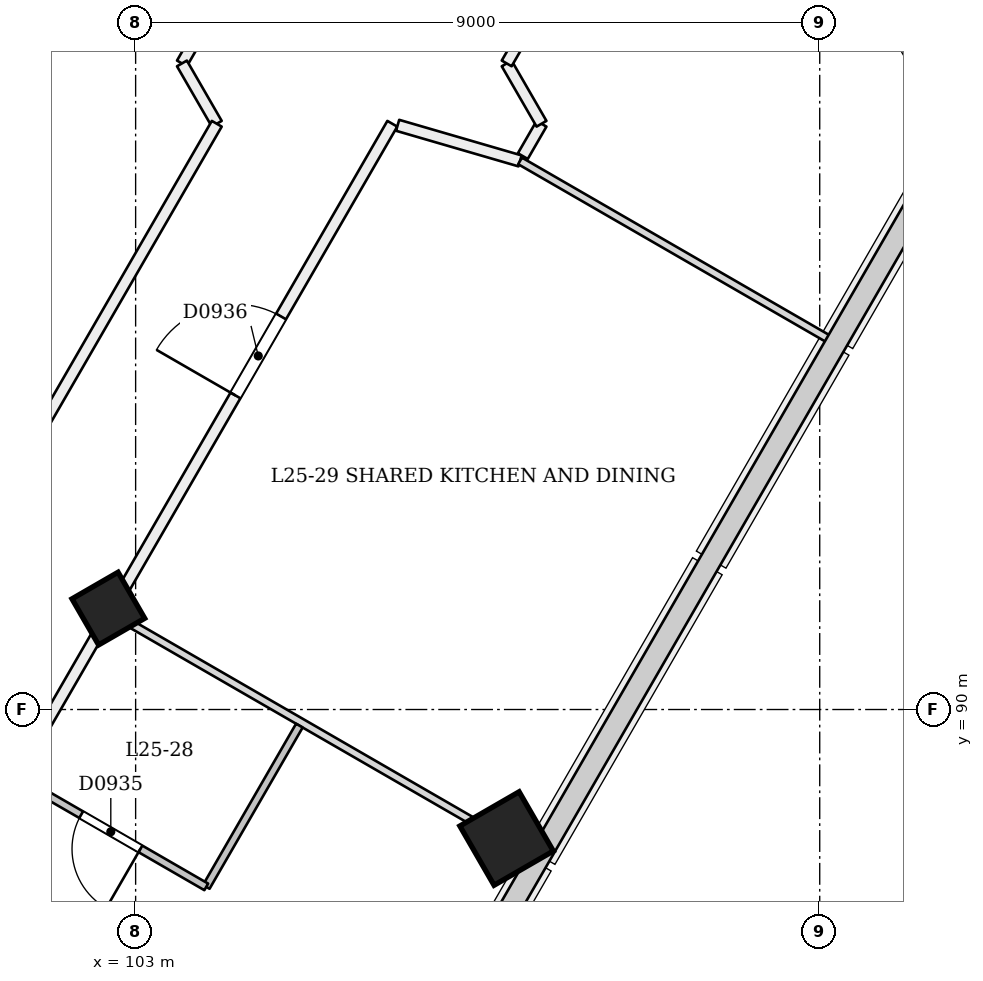
"""IFC4 building model, lengths in metres.
Left out: names, types, materials, properties, quantities, classifications, styles, units other than length and angle.
Written with IfcOpenShell. Run it as: python <this file> out.ifc"""

import sys

from ifc_helpers import new_model, si_unit, direction, frame, frame_2d, origin, origin_2d, place, context, subcontext, project, spatial, rectangle, extrude, element, fill, save


model = new_model("IFC4")
c1 = context("Model", 3, precision=1e-05, world=origin(), true_north=direction((0.0, 1.0)))
c2 = subcontext(c1, "Body", "Model", "MODEL_VIEW")
j1 = project(units=[si_unit("LENGTHUNIT", "METRE"), si_unit("PLANEANGLEUNIT", "RADIAN")], contexts=[c1])
p1 = place(None, origin())
s1 = spatial("IfcSite", under=j1, at=p1, CompositionType="ELEMENT")
p2 = place(p1, origin())
s2 = spatial("IfcBuilding", under=s1, at=p2, CompositionType="ELEMENT")
p3 = place(p2, frame((0.0, 0.0, 100.8)))
s3 = spatial("IfcBuildingStorey", under=s2, at=p3, CompositionType="ELEMENT", Elevation=100.8)
p4 = place(p3, frame((102.668, 91.281, -0.021), z_axis=(-0.02215519141, 0.038415882353, 0.999016199807), x_axis=(-0.50065279292, -0.865364153162, 0.02217348332)))
e1 = element("IfcColumn", 1, at=p4, inside=s3, PredefinedType="COLUMN", context=c2, shape_type="SweptSolid", body=[
    extrude(rectangle(XDim=0.7, YDim=0.7, at=origin_2d()), origin(), (0.0, 0.0, 1.0), 3.604),
])
p5 = place(p3, frame((107.907, 88.257, 0.0), z_axis=(-0.022186675517, 0.038434148665, 0.999014798512), x_axis=(-0.500299208999, -0.865568216906, 0.022189262211)))
e2 = element("IfcColumn", 2, at=p5, inside=s3, PredefinedType="COLUMN", context=c2, shape_type="SweptSolid", body=[
    extrude(rectangle(XDim=0.9, YDim=0.9, at=origin_2d()), origin(), (0.0, 0.0, 1.0), 3.576),
])
p6 = place(p3, frame((85.458, 61.474, 0.0), z_axis=(0.0, 0.0, 1.0), x_axis=(0.500000781663, 0.866024952491, 0.0)))
e3 = element("IfcWall", 3, at=p6, inside=s3, PredefinedType="PARTITIONING", context=c2, shape_type="SweptSolid", body=[
    extrude(rectangle(XDim=41.837, YDim=0.15, at=frame_2d((20.919, 0.0))), origin(), (0.0, 0.0, 1.0), 2.7),
])
p7 = place(p6, frame((0.253, 0.0, 0.0)))
e4 = element("IfcOpeningElement", 4, at=p7, cuts=e3, PredefinedType="OPENING", context=c2, shape_type="SweptSolid", body=[
    extrude(rectangle(XDim=1.2, YDim=2.1, at=frame_2d((0.6, 1.05))), frame((0.0, 0.085, 0.0), z_axis=(0.0, -1.0, 0.0), x_axis=(1.0, 0.0, 0.0)), (0.0, 0.0, 1.0), 0.171),
])
p8 = place(p6, frame((5.719, 0.0, 0.0)))
e5 = element("IfcOpeningElement", 5, at=p8, cuts=e3, PredefinedType="OPENING", context=c2, shape_type="SweptSolid", body=[
    extrude(rectangle(XDim=1.2, YDim=2.1, at=frame_2d((0.6, 1.05))), frame((0.0, 0.085, 0.0), z_axis=(0.0, -1.0, 0.0), x_axis=(1.0, 0.0, 0.0)), (0.0, 0.0, 1.0), 0.171),
])
p9 = place(p6, frame((13.669, 0.0, 0.0)))
e6 = element("IfcOpeningElement", 6, at=p9, cuts=e3, PredefinedType="OPENING", context=c2, shape_type="SweptSolid", body=[
    extrude(rectangle(XDim=1.0, YDim=2.1, at=frame_2d((0.5, 1.05))), frame((0.0, 0.085, 0.0), z_axis=(0.0, -1.0, 0.0), x_axis=(1.0, 0.0, 0.0)), (0.0, 0.0, 1.0), 0.171),
])
p10 = place(p6, frame((18.169, 0.0, 0.0)))
e7 = element("IfcOpeningElement", 7, at=p10, cuts=e3, PredefinedType="OPENING", context=c2, shape_type="SweptSolid", body=[
    extrude(rectangle(XDim=1.0, YDim=2.1, at=frame_2d((0.5, 1.05))), frame((0.0, 0.085, 0.0), z_axis=(0.0, -1.0, 0.0), x_axis=(1.0, 0.0, 0.0)), (0.0, 0.0, 1.0), 0.171),
])
p11 = place(p6, frame((21.639, 0.0, 0.0)))
e8 = element("IfcOpeningElement", 8, at=p11, cuts=e3, PredefinedType="OPENING", context=c2, shape_type="SweptSolid", body=[
    extrude(rectangle(XDim=1.0, YDim=2.1, at=frame_2d((0.5, 1.05))), frame((0.0, 0.085, 0.0), z_axis=(0.0, -1.0, 0.0), x_axis=(1.0, 0.0, 0.0)), (0.0, 0.0, 1.0), 0.171),
])
p12 = place(p6, frame((27.169, 0.0, 0.0)))
e9 = element("IfcOpeningElement", 9, at=p12, cuts=e3, PredefinedType="OPENING", context=c2, shape_type="SweptSolid", body=[
    extrude(rectangle(XDim=1.0, YDim=2.1, at=frame_2d((0.5, 1.05))), frame((0.0, 0.085, 0.0), z_axis=(0.0, -1.0, 0.0), x_axis=(1.0, 0.0, 0.0)), (0.0, 0.0, 1.0), 0.171),
])
p13 = place(p6, frame((30.639, 0.0, 0.0)))
e10 = element("IfcOpeningElement", 10, at=p13, cuts=e3, PredefinedType="OPENING", context=c2, shape_type="SweptSolid", body=[
    extrude(rectangle(XDim=1.0, YDim=2.1, at=frame_2d((0.5, 1.05))), frame((0.0, 0.085, 0.0), z_axis=(0.0, -1.0, 0.0), x_axis=(1.0, 0.0, 0.0)), (0.0, 0.0, 1.0), 0.171),
])
p14 = place(p6, frame((37.71, 0.0, 0.0)))
e11 = element("IfcOpeningElement", 11, at=p14, cuts=e3, PredefinedType="OPENING", context=c2, shape_type="SweptSolid", body=[
    extrude(rectangle(XDim=1.2, YDim=2.1, at=frame_2d((0.6, 1.05))), frame((0.0, 0.085, 0.0), z_axis=(0.0, -1.0, 0.0), x_axis=(1.0, 0.0, 0.0)), (0.0, 0.0, 1.0), 0.171),
])
p15 = place(p3, frame((106.447, 97.686, 0.0), z_axis=(0.0, 0.0, 1.0), x_axis=(0.96025063578, -0.279139242108, 0.0)))
e12 = element("IfcWall", 12, at=p15, inside=s3, PredefinedType="PARTITIONING", context=c2, shape_type="SweptSolid", body=[
    extrude(rectangle(XDim=1.677, YDim=0.15, at=frame_2d((0.839, 0.0))), origin(), (0.0, 0.0, 1.0), 3.1),
])
p16 = place(p3, frame((108.094, 97.281, 0.0), z_axis=(0.0, 0.0, 1.0), x_axis=(0.500037662692, 0.866003658127, 0.0)))
e13 = element("IfcWall", 13, at=p16, inside=s3, PredefinedType="PARTITIONING", context=c2, shape_type="SweptSolid", body=[
    extrude(rectangle(XDim=0.492, YDim=0.15, at=frame_2d((0.246, 0.0))), origin(), (0.0, 0.0, 1.0), 3.1),
])
p17 = place(p3, frame((108.34, 97.706, 0.0), z_axis=(0.0, 0.0, 1.0), x_axis=(-0.500006847747, 0.8660214502, 0.0)))
e14 = element("IfcWall", 14, at=p17, inside=s3, PredefinedType="PARTITIONING", context=c2, shape_type="SweptSolid", body=[
    extrude(rectangle(XDim=0.917, YDim=0.15, at=frame_2d((0.458, 0.0))), origin(), (0.0, 0.0, 1.0), 3.1),
])
p18 = place(p3, frame((107.882, 98.5, 0.0), z_axis=(0.0, 0.0, 1.0), x_axis=(0.499951854219, 0.86605319898, 0.0)))
e15 = element("IfcWall", 15, at=p18, inside=s3, PredefinedType="PARTITIONING", context=c2, shape_type="SweptSolid", body=[
    extrude(rectangle(XDim=1.873, YDim=0.15, at=frame_2d((0.937, 0.0))), origin(), (0.0, 0.0, 1.0), 3.1),
])
p19 = place(p3, frame((104.764, 100.5, 0.0), z_axis=(0.0, 0.0, 1.0), x_axis=(-0.500027479704, -0.866009537788, 0.0)))
e16 = element("IfcWall", 16, at=p19, inside=s3, PredefinedType="PARTITIONING", context=c2, shape_type="SweptSolid", body=[
    extrude(rectangle(XDim=2.309, YDim=0.15, at=frame_2d((1.155, 0.0))), origin(), (0.0, 0.0, 1.0), 3.1),
])
p20 = place(p3, frame((103.609, 98.5, 0.0), z_axis=(0.0, 0.0, 1.0), x_axis=(0.500006847747, -0.8660214502, 0.0)))
e17 = element("IfcWall", 17, at=p20, inside=s3, PredefinedType="PARTITIONING", context=c2, shape_type="SweptSolid", body=[
    extrude(rectangle(XDim=0.917, YDim=0.15, at=frame_2d((0.458, 0.0))), origin(), (0.0, 0.0, 1.0), 3.1),
])
p21 = place(p3, frame((104.067, 97.706, 0.0), z_axis=(0.0, 0.0, 1.0), x_axis=(-0.499978838982, -0.866037620759, 0.0)))
e18 = element("IfcWall", 18, at=p21, inside=s3, PredefinedType="PARTITIONING", context=c2, shape_type="SweptSolid", body=[
    extrude(rectangle(XDim=6.127, YDim=0.15, at=frame_2d((3.063, 0.0))), origin(), (0.0, 0.0, 1.0), 3.1),
])
p22 = place(p3, frame((105.154, 89.788, 0.0), z_axis=(0.0, 0.0, 1.0), x_axis=(-0.500018594424, -0.866014668023, 0.0)))
e19 = element("IfcWall", 19, at=p22, inside=s3, PredefinedType="PARTITIONING", context=c2, shape_type="SweptSolid", body=[
    extrude(rectangle(XDim=2.45, YDim=0.1, at=frame_2d((1.225, 0.0))), origin(), (0.0, 0.0, 1.0), 2.7),
])
p23 = place(p3, frame((103.929, 87.667, 0.0), z_axis=(0.0, 0.0, 1.0), x_axis=(-0.866048868473, 0.499959355765, 0.0)))
e20 = element("IfcWall", 20, at=p23, inside=s3, PredefinedType="PARTITIONING", context=c2, shape_type="SweptSolid", body=[
    extrude(rectangle(XDim=2.825, YDim=0.1, at=frame_2d((1.413, 0.0))), origin(), (0.0, 0.0, 1.0), 3.1),
])
p24 = place(p23, frame((1.0, 0.0, 0.0)))
e21 = element("IfcOpeningElement", 21, at=p24, cuts=e20, PredefinedType="OPENING", context=c2, shape_type="SweptSolid", body=[
    extrude(rectangle(XDim=0.9, YDim=2.1, at=frame_2d((0.45, 1.05))), frame((0.0, 0.061, 0.0), z_axis=(0.0, -1.0, 0.0), x_axis=(1.0, 0.0, 0.0)), (0.0, 0.0, 1.0), 0.121),
])
p25 = place(p3, frame((108.21, 88.082, 0.0), z_axis=(0.0, 0.0, 1.0), x_axis=(-0.866025537322, 0.499999768706, 0.0)))
e22 = element("IfcWall", 22, at=p25, inside=s3, PredefinedType="PARTITIONING", context=c2, shape_type="SweptSolid", body=[
    extrude(rectangle(XDim=6.325, YDim=0.1, at=frame_2d((3.163, 0.0))), origin(), (0.0, 0.0, 1.0), 2.6),
])
p26 = place(p3, frame((112.146, 94.857, 0.0), z_axis=(0.0, 0.0, 1.0), x_axis=(-0.866028828302, 0.499994068514, 0.0)))
e23 = element("IfcWall", 23, at=p26, inside=s3, PredefinedType="PARTITIONING", context=c2, shape_type="SweptSolid", body=[
    extrude(rectangle(XDim=4.72, YDim=0.1, at=frame_2d((2.36, 0.0))), origin(), (0.0, 0.0, 1.0), 2.6),
])
p27 = place(p24, origin())
e24 = element("IfcDoor", 24, at=p27, inside=s3, OperationType="SINGLE_SWING_LEFT", PredefinedType="NOTDEFINED", context=c2, shape_type="SweptSolid", body=[
    extrude(rectangle(XDim=0.9, YDim=2.1, at=frame_2d((0.45, 1.05))), frame((0.0, 0.025, 0.0), z_axis=(0.0, -1.0, 0.0), x_axis=(1.0, 0.0, 0.0)), (0.0, 0.0, 1.0), 0.05),
])
fill(e21, e24)
p28 = place(p14, origin())
e25 = element("IfcDoor", 25, at=p28, inside=s3, OperationType="SINGLE_SWING_LEFT", PredefinedType="NOTDEFINED", context=c2, shape_type="SweptSolid", body=[
    extrude(rectangle(XDim=1.2, YDim=2.1, at=frame_2d((0.6, 1.05))), frame((0.0, 0.025, 0.0), z_axis=(0.0, -1.0, 0.0), x_axis=(1.0, 0.0, 0.0)), (0.0, 0.0, 1.0), 0.05),
])
fill(e11, e25)
save(model, sys.argv[1])
